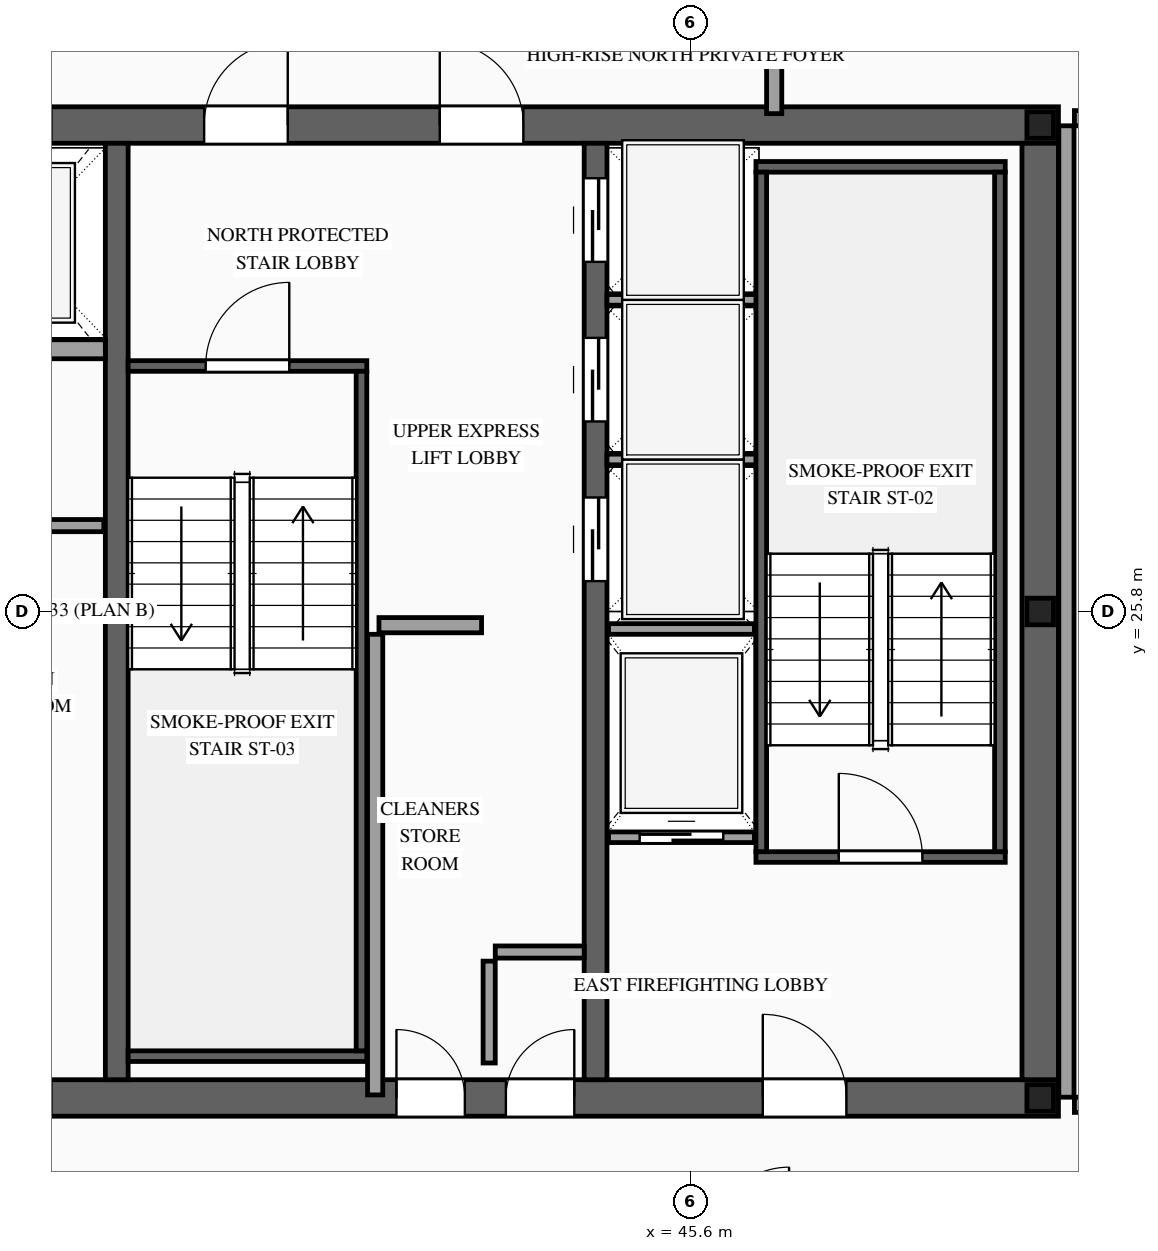
"""IFC4 building model, lengths in metres.
Left out: names, types, materials, properties, quantities, classifications, styles, units other than length and angle.
Written with IfcOpenShell. Run it as: python <this file> out.ifc"""

import sys

from ifc_helpers import new_model, si_unit, direction, frame, frame_2d, origin, origin_2d, place, context, subcontext, project, spatial, rectangle, i_section, extrude, source, transform, mapped, element, fill, save


model = new_model("IFC4")
c1 = context("Model", 3, precision=1e-05, world=origin(), true_north=direction((0.0, 1.0)))
c2 = subcontext(c1, "Body", "Model", "MODEL_VIEW")
j1 = project(units=[si_unit("LENGTHUNIT", "METRE"), si_unit("PLANEANGLEUNIT", "RADIAN")], contexts=[c1])
p1 = place(None, origin())
s1 = spatial("IfcSite", under=j1, at=p1, CompositionType="ELEMENT")
p2 = place(p1, origin())
s2 = spatial("IfcBuilding", under=s1, at=p2, CompositionType="ELEMENT")
p3 = place(p2, frame((0.0, 0.0, 325.2)))
s3 = spatial("IfcBuildingStorey", under=s2, at=p3, CompositionType="ELEMENT", Elevation=325.2)
p4 = place(p3, frame((23.56, 19.4, 0.0), z_axis=(0.0, 0.0, 1.0), x_axis=(1.0, 0.0, 0.0)))
e1 = element("IfcWall", 1, at=p4, inside=s3, PredefinedType="SHEAR", context=c2, shape_type="SweptSolid", body=[
    extrude(rectangle(XDim=26.88, YDim=0.48, at=frame_2d((13.44, 0.0))), origin(), (0.0, 0.0, 1.0), 3.5),
])
p5 = place(p4, frame((1.89, 0.0, 0.0)))
e2 = element("IfcOpeningElement", 2, at=p5, cuts=e1, PredefinedType="OPENING", context=c2, shape_type="SweptSolid", body=[
    extrude(rectangle(XDim=1.1, YDim=2.2, at=frame_2d((0.55, 1.1))), frame((0.0, 0.255, 0.0), z_axis=(0.0, -1.0, 0.0), x_axis=(1.0, 0.0, 0.0)), (0.0, 0.0, 1.0), 0.51),
])
p6 = place(p4, frame((9.79, 0.0, 0.0)))
e3 = element("IfcOpeningElement", 3, at=p6, cuts=e1, PredefinedType="OPENING", context=c2, shape_type="SweptSolid", body=[
    extrude(rectangle(XDim=1.1, YDim=2.2, at=frame_2d((0.55, 1.1))), frame((0.0, 0.255, 0.0), z_axis=(0.0, -1.0, 0.0), x_axis=(1.0, 0.0, 0.0)), (0.0, 0.0, 1.0), 0.51),
])
p7 = place(p4, frame((22.99, 0.0, 0.0)))
e4 = element("IfcOpeningElement", 4, at=p7, cuts=e1, PredefinedType="OPENING", context=c2, shape_type="SweptSolid", body=[
    extrude(rectangle(XDim=1.1, YDim=2.2, at=frame_2d((0.55, 1.1))), frame((0.0, 0.255, 0.0), z_axis=(0.0, -1.0, 0.0), x_axis=(1.0, 0.0, 0.0)), (0.0, 0.0, 1.0), 0.51),
])
p8 = place(p4, frame((19.61, 0.0, 0.0)))
e5 = element("IfcOpeningElement", 5, at=p8, cuts=e1, PredefinedType="OPENING", context=c2, shape_type="SweptSolid", body=[
    extrude(rectangle(XDim=0.9, YDim=2.15, at=frame_2d((0.45, 1.075))), frame((0.0, 0.255, 0.0), z_axis=(0.0, -1.0, 0.0), x_axis=(1.0, 0.0, 0.0)), (0.0, 0.0, 1.0), 0.51),
])
p9 = place(p4, frame((18.17, 0.0, 0.0)))
e6 = element("IfcOpeningElement", 6, at=p9, cuts=e1, PredefinedType="OPENING", context=c2, shape_type="SweptSolid", body=[
    extrude(rectangle(XDim=0.9, YDim=2.15, at=frame_2d((0.45, 1.075))), frame((0.0, 0.255, 0.0), z_axis=(0.0, -1.0, 0.0), x_axis=(1.0, 0.0, 0.0)), (0.0, 0.0, 1.0), 0.51),
])
p10 = place(p3, frame((23.56, 32.2, 0.0), z_axis=(0.0, 0.0, 1.0), x_axis=(1.0, 0.0, 0.0)))
e7 = element("IfcWall", 7, at=p10, inside=s3, PredefinedType="SHEAR", context=c2, shape_type="SweptSolid", body=[
    extrude(rectangle(XDim=26.88, YDim=0.48, at=frame_2d((13.44, 0.0))), origin(), (0.0, 0.0, 1.0), 3.5),
])
p11 = place(p10, frame((4.51, 0.0, 0.0)))
e8 = element("IfcOpeningElement", 8, at=p11, cuts=e7, PredefinedType="OPENING", context=c2, shape_type="SweptSolid", body=[
    extrude(rectangle(XDim=0.9, YDim=2.15, at=frame_2d((0.45, 1.075))), frame((0.0, 0.255, 0.0), z_axis=(0.0, -1.0, 0.0), x_axis=(1.0, 0.0, 0.0)), (0.0, 0.0, 1.0), 0.51),
])
p12 = place(p10, frame((9.79, 0.0, 0.0)))
e9 = element("IfcOpeningElement", 9, at=p12, cuts=e7, PredefinedType="OPENING", context=c2, shape_type="SweptSolid", body=[
    extrude(rectangle(XDim=1.1, YDim=2.2, at=frame_2d((0.55, 1.1))), frame((0.0, 0.255, 0.0), z_axis=(0.0, -1.0, 0.0), x_axis=(1.0, 0.0, 0.0)), (0.0, 0.0, 1.0), 0.51),
])
p13 = place(p10, frame((15.64, 0.0, 0.0)))
e10 = element("IfcOpeningElement", 10, at=p13, cuts=e7, PredefinedType="OPENING", context=c2, shape_type="SweptSolid", body=[
    extrude(rectangle(XDim=1.1, YDim=2.2, at=frame_2d((0.55, 1.1))), frame((0.0, 0.255, 0.0), z_axis=(0.0, -1.0, 0.0), x_axis=(1.0, 0.0, 0.0)), (0.0, 0.0, 1.0), 0.51),
])
p14 = place(p10, frame((18.74, 0.0, 0.0)))
e11 = element("IfcOpeningElement", 11, at=p14, cuts=e7, PredefinedType="OPENING", context=c2, shape_type="SweptSolid", body=[
    extrude(rectangle(XDim=1.1, YDim=2.2, at=frame_2d((0.55, 1.1))), frame((0.0, 0.255, 0.0), z_axis=(0.0, -1.0, 0.0), x_axis=(1.0, 0.0, 0.0)), (0.0, 0.0, 1.0), 0.51),
])
m1 = source(origin(), c2, "Body", "SweptSolid", [
    extrude(rectangle(XDim=12.32, YDim=0.48, at=frame_2d((6.16, 0.0))), origin(), (0.0, 0.0, 1.0), 3.5),
])
p15 = place(p3, frame((50.2, 19.64, 0.0), z_axis=(0.0, 0.0, 1.0), x_axis=(0.0, 1.0, 0.0)))
e12 = element("IfcWall", 12, at=p15, inside=s3, PredefinedType="SHEAR", context=c2, shape_type="MappedRepresentation", body=[
    mapped(m1, transform((0.0, 0.0, 0.0), scale=1.0)),
])
m2 = source(origin(), c2, "Body", "SweptSolid", [
    extrude(rectangle(XDim=12.32, YDim=0.3, at=frame_2d((6.16, 0.0))), origin(), (0.0, 0.0, 1.0), 3.5),
])
p16 = place(p3, frame((38.05, 19.64, 0.0), z_axis=(0.0, 0.0, 1.0), x_axis=(0.0, 1.0, 0.0)))
e13 = element("IfcWall", 13, at=p16, inside=s3, PredefinedType="SOLIDWALL", context=c2, shape_type="MappedRepresentation", body=[
    mapped(m2, transform((0.0, 0.0, 0.0), scale=1.0)),
])
p17 = place(p3, frame((44.35, 19.64, 0.0), z_axis=(0.0, 0.0, 1.0), x_axis=(0.0, 1.0, 0.0)))
e14 = element("IfcWall", 14, at=p17, inside=s3, PredefinedType="SOLIDWALL", context=c2, shape_type="SweptSolid", body=[
    extrude(rectangle(XDim=12.32, YDim=0.3, at=frame_2d((6.16, 0.0))), origin(), (0.0, 0.0, 1.0), 3.5),
])
p18 = place(p17, frame((6.56, 0.0, 0.0)))
e15 = element("IfcOpeningElement", 15, at=p18, cuts=e14, PredefinedType="OPENING", context=c2, shape_type="SweptSolid", body=[
    extrude(rectangle(XDim=1.1, YDim=2.2, at=frame_2d((0.55, 1.1))), frame((0.0, 0.165, 0.0), z_axis=(0.0, -1.0, 0.0), x_axis=(1.0, 0.0, 0.0)), (0.0, 0.0, 1.0), 0.33),
])
p19 = place(p17, frame((8.66, 0.0, 0.0)))
e16 = element("IfcOpeningElement", 16, at=p19, cuts=e14, PredefinedType="OPENING", context=c2, shape_type="SweptSolid", body=[
    extrude(rectangle(XDim=1.1, YDim=2.2, at=frame_2d((0.55, 1.1))), frame((0.0, 0.165, 0.0), z_axis=(0.0, -1.0, 0.0), x_axis=(1.0, 0.0, 0.0)), (0.0, 0.0, 1.0), 0.33),
])
p20 = place(p17, frame((10.76, 0.0, 0.0)))
e17 = element("IfcOpeningElement", 17, at=p20, cuts=e14, PredefinedType="OPENING", context=c2, shape_type="SweptSolid", body=[
    extrude(rectangle(XDim=1.1, YDim=2.2, at=frame_2d((0.55, 1.1))), frame((0.0, 0.165, 0.0), z_axis=(0.0, -1.0, 0.0), x_axis=(1.0, 0.0, 0.0)), (0.0, 0.0, 1.0), 0.33),
])
m3 = source(origin(), c2, "Body", "SweptSolid", [
    extrude(i_section(OverallWidth=0.35, OverallDepth=0.35, WebThickness=0.012, FlangeThickness=0.019, at=origin_2d()), origin(), (0.0, 0.0, 1.0), 3.5),
])
for number, where, z_axis, x_axis in (
    (18, (50.2, 19.4, 0.0), (0.0, 0.0, 1.0), (1.0, 0.0, 0.0)),
    (19, (50.2, 25.8, 0.0), (0.0, 0.0, 1.0), (1.0, 0.0, 0.0)),
    (20, (50.2, 32.2, 0.0), (0.0, 0.0, 1.0), (1.0, 0.0, 0.0)),
):
    element("IfcColumn", number, at=place(p3, frame(where, z_axis=z_axis, x_axis=x_axis)), inside=s3, PredefinedType="COLUMN", context=c2, shape_type="MappedRepresentation", body=[
        mapped(m3, transform((0.0, 0.0, 0.0), scale=1.0)),
    ])
p21 = place(p3, frame((44.52, 22.83, 0.0), z_axis=(0.0, 0.0, 1.0), x_axis=(1.0, 0.0, 0.0)))
e21 = element("IfcWall", 21, at=p21, inside=s3, PredefinedType="SOLIDWALL", context=c2, shape_type="SweptSolid", body=[
    extrude(rectangle(XDim=1.92, YDim=0.14, at=frame_2d((0.96, 0.0))), origin(), (0.0, 0.0, 1.0), 3.28),
])
p22 = place(p21, frame((0.41, 0.0, 0.0)))
e22 = element("IfcOpeningElement", 22, at=p22, cuts=e21, PredefinedType="OPENING", context=c2, shape_type="SweptSolid", body=[
    extrude(rectangle(XDim=1.1, YDim=2.2, at=frame_2d((0.55, 1.1))), frame((0.0, 0.085, 0.0), z_axis=(0.0, -1.0, 0.0), x_axis=(1.0, 0.0, 0.0)), (0.0, 0.0, 1.0), 0.17),
])
m4 = source(origin(), c2, "Body", "SweptSolid", [
    extrude(rectangle(XDim=1.92, YDim=0.14, at=frame_2d((0.96, 0.0))), origin(), (0.0, 0.0, 1.0), 3.28),
])
p23 = place(p3, frame((44.52, 25.57, 0.0), z_axis=(0.0, 0.0, 1.0), x_axis=(1.0, 0.0, 0.0)))
e23 = element("IfcWall", 23, at=p23, inside=s3, PredefinedType="SOLIDWALL", context=c2, shape_type="MappedRepresentation", body=[
    mapped(m4, transform((0.0, 0.0, 0.0), scale=1.0)),
])
m5 = source(origin(), c2, "Body", "SweptSolid", [
    extrude(rectangle(XDim=2.4, YDim=0.25, at=frame_2d((1.2, 0.0))), origin(), (0.0, 0.0, 1.0), 3.28),
])
p24 = place(p3, frame((35.5, 29.25, 0.0), z_axis=(0.0, 0.0, 1.0), x_axis=(1.0, 0.0, 0.0)))
e24 = element("IfcWall", 24, at=p24, inside=s3, PredefinedType="SOLIDWALL", context=c2, shape_type="MappedRepresentation", body=[
    mapped(m5, transform((0.0, 0.0, 0.0), scale=1.0)),
])
m6 = source(origin(), c2, "Body", "SweptSolid", [
    extrude(rectangle(XDim=2.0, YDim=0.14, at=frame_2d((1.0, 0.0))), origin(), (0.0, 0.0, 1.0), 3.28),
])
for number, where, z_axis, x_axis in (
    (25, (44.5, 27.8, 0.0), (0.0, 0.0, 1.0), (1.0, 0.0, 0.0)),
    (26, (44.5, 29.9, 0.0), (0.0, 0.0, 1.0), (1.0, 0.0, 0.0)),
):
    element("IfcWall", number, at=place(p3, frame(where, z_axis=z_axis, x_axis=x_axis)), inside=s3, PredefinedType="SOLIDWALL", context=c2, shape_type="MappedRepresentation", body=[
        mapped(m6, transform((0.0, 0.0, 0.0), scale=1.0)),
    ])
p25 = place(p3, frame((46.46, 22.57, 0.0), z_axis=(0.0, 0.0, 1.0), x_axis=(1.0, 0.0, 0.0)))
e27 = element("IfcWall", 27, at=p25, inside=s3, PredefinedType="SOLIDWALL", context=c2, shape_type="SweptSolid", body=[
    extrude(rectangle(XDim=3.28, YDim=0.14, at=frame_2d((1.64, 0.0))), origin(), (0.0, 0.0, 1.0), 3.28),
])
p26 = place(p25, frame((1.09, 0.0, 0.0)))
e28 = element("IfcOpeningElement", 28, at=p26, cuts=e27, PredefinedType="OPENING", context=c2, shape_type="SweptSolid", body=[
    extrude(rectangle(XDim=1.1, YDim=2.2, at=frame_2d((0.55, 1.1))), frame((0.0, 0.085, 0.0), z_axis=(0.0, -1.0, 0.0), x_axis=(1.0, 0.0, 0.0)), (0.0, 0.0, 1.0), 0.17),
])
m7 = source(origin(), c2, "Body", "SweptSolid", [
    extrude(rectangle(XDim=3.28, YDim=0.14, at=frame_2d((1.64, 0.0))), origin(), (0.0, 0.0, 1.0), 3.28),
])
p27 = place(p3, frame((46.46, 31.65, 0.0), z_axis=(0.0, 0.0, 1.0), x_axis=(1.0, 0.0, 0.0)))
e29 = element("IfcWall", 29, at=p27, inside=s3, PredefinedType="SOLIDWALL", context=c2, shape_type="MappedRepresentation", body=[
    mapped(m7, transform((0.0, 0.0, 0.0), scale=1.0)),
])
m8 = source(origin(), c2, "Body", "SweptSolid", [
    extrude(rectangle(XDim=8.94, YDim=0.14, at=frame_2d((4.47, 0.0))), origin(), (0.0, 0.0, 1.0), 3.28),
])
for number, where, z_axis, x_axis in (
    (30, (46.53, 22.64, 0.0), (0.0, 0.0, 1.0), (0.0, 1.0, 0.0)),
    (31, (49.67, 22.64, 0.0), (0.0, 0.0, 1.0), (0.0, 1.0, 0.0)),
):
    element("IfcWall", number, at=place(p3, frame(where, z_axis=z_axis, x_axis=x_axis)), inside=s3, PredefinedType="SOLIDWALL", context=c2, shape_type="MappedRepresentation", body=[
        mapped(m8, transform((0.0, 0.0, 0.0), scale=1.0)),
    ])
p28 = place(p3, frame((38.2, 29.03, 0.0), z_axis=(0.0, 0.0, 1.0), x_axis=(1.0, 0.0, 0.0)))
e32 = element("IfcWall", 32, at=p28, inside=s3, PredefinedType="SOLIDWALL", context=c2, shape_type="SweptSolid", body=[
    extrude(rectangle(XDim=3.14, YDim=0.14, at=frame_2d((1.57, 0.0))), origin(), (0.0, 0.0, 1.0), 3.28),
])
p29 = place(p28, frame((1.02, 0.0, 0.0)))
e33 = element("IfcOpeningElement", 33, at=p29, cuts=e32, PredefinedType="OPENING", context=c2, shape_type="SweptSolid", body=[
    extrude(rectangle(XDim=1.1, YDim=2.2, at=frame_2d((0.55, 1.1))), frame((0.0, 0.085, 0.0), z_axis=(0.0, -1.0, 0.0), x_axis=(1.0, 0.0, 0.0)), (0.0, 0.0, 1.0), 0.17),
])
m9 = source(origin(), c2, "Body", "SweptSolid", [
    extrude(rectangle(XDim=3.14, YDim=0.14, at=frame_2d((1.57, 0.0))), origin(), (0.0, 0.0, 1.0), 3.28),
])
p30 = place(p3, frame((38.2, 19.95, 0.0), z_axis=(0.0, 0.0, 1.0), x_axis=(1.0, 0.0, 0.0)))
e34 = element("IfcWall", 34, at=p30, inside=s3, PredefinedType="SOLIDWALL", context=c2, shape_type="MappedRepresentation", body=[
    mapped(m9, transform((0.0, 0.0, 0.0), scale=1.0)),
])
m10 = source(origin(), c2, "Body", "SweptSolid", [
    extrude(rectangle(XDim=8.94, YDim=0.14, at=frame_2d((4.47, 0.0))), origin(), (0.0, 0.0, 1.0), 3.28),
])
p31 = place(p3, frame((41.27, 20.02, 0.0), z_axis=(0.0, 0.0, 1.0), x_axis=(0.0, 1.0, 0.0)))
e35 = element("IfcWall", 35, at=p31, inside=s3, PredefinedType="SOLIDWALL", context=c2, shape_type="MappedRepresentation", body=[
    mapped(m10, transform((0.0, 0.0, 0.0), scale=1.0)),
])
m11 = source(origin(), c2, "Body", "SweptSolid", [
    extrude(rectangle(XDim=2.36, YDim=0.16, at=frame_2d((1.18, 0.0))), origin(), (0.0, 0.0, 1.0), 3.28),
])
p32 = place(p3, frame((35.52, 26.93, 0.0), z_axis=(0.0, 0.0, 1.0), x_axis=(1.0, 0.0, 0.0)))
e36 = element("IfcWall", 36, at=p32, inside=s3, PredefinedType="PARTITIONING", context=c2, shape_type="MappedRepresentation", body=[
    mapped(m11, transform((0.0, 0.0, 0.0), scale=1.0)),
])
m12 = source(origin(), c2, "Body", "SweptSolid", [
    extrude(rectangle(XDim=1.34, YDim=0.16, at=frame_2d((0.67, 0.0))), origin(), (0.0, 0.0, 1.0), 3.28),
])
p33 = place(p3, frame((42.95, 19.86, 0.0), z_axis=(0.0, 0.0, 1.0), x_axis=(0.0, 1.0, 0.0)))
e37 = element("IfcWall", 37, at=p33, inside=s3, PredefinedType="PARTITIONING", context=c2, shape_type="MappedRepresentation", body=[
    mapped(m12, transform((0.0, 0.0, 0.0), scale=1.0)),
])
m13 = source(origin(), c2, "Body", "SweptSolid", [
    extrude(rectangle(XDim=1.17, YDim=0.16, at=frame_2d((0.585, 0.0))), origin(), (0.0, 0.0, 1.0), 3.28),
])
p34 = place(p3, frame((43.03, 21.32, 0.0), z_axis=(0.0, 0.0, 1.0), x_axis=(1.0, 0.0, 0.0)))
e38 = element("IfcWall", 38, at=p34, inside=s3, PredefinedType="PARTITIONING", context=c2, shape_type="MappedRepresentation", body=[
    mapped(m13, transform((0.0, 0.0, 0.0), scale=1.0)),
])
m14 = source(origin(), c2, "Body", "SweptSolid", [
    extrude(rectangle(XDim=6.06, YDim=0.2, at=frame_2d((3.03, 0.0))), origin(), (0.0, 0.0, 1.0), 3.28),
])
p35 = place(p3, frame((41.45, 19.44, 0.0), z_axis=(0.0, 0.0, 1.0), x_axis=(0.0, 1.0, 0.0)))
e39 = element("IfcWall", 39, at=p35, inside=s3, PredefinedType="PARTITIONING", context=c2, shape_type="MappedRepresentation", body=[
    mapped(m14, transform((0.0, 0.0, 0.0), scale=1.0)),
])
m15 = source(origin(), c2, "Body", "SweptSolid", [
    extrude(rectangle(XDim=1.35, YDim=0.2, at=frame_2d((0.675, 0.0))), origin(), (0.0, 0.0, 1.0), 3.28),
])
p36 = place(p3, frame((41.5, 25.62, 0.0), z_axis=(0.0, 0.0, 1.0), x_axis=(1.0, 0.0, 0.0)))
e40 = element("IfcWall", 40, at=p36, inside=s3, PredefinedType="PARTITIONING", context=c2, shape_type="MappedRepresentation", body=[
    mapped(m15, transform((0.0, 0.0, 0.0), scale=1.0)),
])
m16 = source(origin(), c2, "Body", "SweptSolid", [
    extrude(rectangle(XDim=1.7, YDim=0.2, at=frame_2d((0.85, 0.0))), origin(), (0.0, 0.0, 1.0), 3.28),
])
p37 = place(p3, frame((46.7, 32.35, 0.0), z_axis=(0.0, 0.0, 1.0), x_axis=(0.0, 1.0, 0.0)))
e41 = element("IfcWall", 41, at=p37, inside=s3, PredefinedType="PARTITIONING", context=c2, shape_type="MappedRepresentation", body=[
    mapped(m16, transform((0.0, 0.0, 0.0), scale=1.0)),
])
p38 = place(p3, frame((50.65, 19.31, 0.0), z_axis=(0.0, 0.0, 1.0), x_axis=(1.0, 0.0, 0.0)))
e42 = element("IfcWall", 42, at=p38, inside=s3, PredefinedType="PARTITIONING", context=c2, shape_type="SweptSolid", body=[
    extrude(rectangle(XDim=5.3, YDim=0.2, at=frame_2d((2.65, 0.0))), origin(), (0.0, 0.0, 1.0), 2.825),
])
p39 = place(p38, frame((0.4, 0.0, 0.0)))
e43 = element("IfcOpeningElement", 43, at=p39, cuts=e42, PredefinedType="OPENING", context=c2, shape_type="SweptSolid", body=[
    extrude(rectangle(XDim=1.0, YDim=2.2, at=frame_2d((0.5, 1.1))), frame((0.0, 0.115, 0.0), z_axis=(0.0, -1.0, 0.0), x_axis=(1.0, 0.0, 0.0)), (0.0, 0.0, 1.0), 0.23),
])
m17 = source(origin(), c2, "Body", "SweptSolid", [
    extrude(rectangle(XDim=5.3, YDim=0.2, at=frame_2d((2.65, 0.0))), origin(), (0.0, 0.0, 1.0), 2.825),
])
p40 = place(p3, frame((50.65, 32.29, 0.0), z_axis=(0.0, 0.0, 1.0), x_axis=(1.0, 0.0, 0.0)))
e44 = element("IfcWall", 44, at=p40, inside=s3, PredefinedType="PARTITIONING", context=c2, shape_type="MappedRepresentation", body=[
    mapped(m17, transform((0.0, 0.0, 0.0), scale=1.0)),
])
m18 = source(origin(), c2, "Body", "SweptSolid", [
    extrude(rectangle(XDim=12.78, YDim=0.2, at=frame_2d((6.39, 0.0))), origin(), (0.0, 0.0, 1.0), 3.28),
])
p41 = place(p3, frame((50.545, 19.41, 0.0), z_axis=(0.0, 0.0, 1.0), x_axis=(0.0, 1.0, 0.0)))
e45 = element("IfcWall", 45, at=p41, inside=s3, PredefinedType="PARTITIONING", context=c2, shape_type="MappedRepresentation", body=[
    mapped(m18, transform((0.0, 0.0, 0.0), scale=1.0)),
])
m19 = source(origin(), c2, "Body", "SweptSolid", [
    extrude(rectangle(XDim=1.1, YDim=2.2, at=frame_2d((0.55, 1.1))), frame((0.0, 0.025, 0.0), z_axis=(0.0, -1.0, 0.0), x_axis=(1.0, 0.0, 0.0)), (0.0, 0.0, 1.0), 0.05),
])
p42 = place(p22, origin())
e46 = element("IfcDoor", 46, at=p42, inside=s3, OperationType="SLIDING_TO_RIGHT", PredefinedType="DOOR", context=c2, shape_type="MappedRepresentation", body=[
    mapped(m19, transform((0.0, 0.0, 0.0), scale=1.0)),
])
fill(e22, e46)
p43 = place(p18, origin())
e47 = element("IfcDoor", 47, at=p43, inside=s3, OperationType="SLIDING_TO_LEFT", PredefinedType="DOOR", context=c2, shape_type="MappedRepresentation", body=[
    mapped(m19, transform((0.0, 0.0, 0.0), scale=1.0)),
])
fill(e15, e47)
p44 = place(p19, origin())
e48 = element("IfcDoor", 48, at=p44, inside=s3, OperationType="SLIDING_TO_RIGHT", PredefinedType="DOOR", context=c2, shape_type="MappedRepresentation", body=[
    mapped(m19, transform((0.0, 0.0, 0.0), scale=1.0)),
])
fill(e16, e48)
p45 = place(p20, origin())
e49 = element("IfcDoor", 49, at=p45, inside=s3, OperationType="SLIDING_TO_LEFT", PredefinedType="DOOR", context=c2, shape_type="MappedRepresentation", body=[
    mapped(m19, transform((0.0, 0.0, 0.0), scale=1.0)),
])
fill(e17, e49)
m20 = source(origin(), c2, "Body", "SweptSolid", [
    extrude(rectangle(XDim=1.1, YDim=2.2, at=frame_2d((0.55, 1.1))), frame((0.0, 0.025, 0.0), z_axis=(0.0, -1.0, 0.0), x_axis=(1.0, 0.0, 0.0)), (0.0, 0.0, 1.0), 0.05),
])
p46 = place(p26, origin())
e50 = element("IfcDoor", 50, at=p46, inside=s3, OperationType="SINGLE_SWING_LEFT", PredefinedType="DOOR", context=c2, shape_type="MappedRepresentation", body=[
    mapped(m20, transform((0.0, 0.0, 0.0), scale=1.0)),
])
fill(e28, e50)
p47 = place(p29, origin())
e51 = element("IfcDoor", 51, at=p47, inside=s3, OperationType="SINGLE_SWING_RIGHT", PredefinedType="DOOR", context=c2, shape_type="MappedRepresentation", body=[
    mapped(m20, transform((0.0, 0.0, 0.0), scale=1.0)),
])
fill(e33, e51)
p48 = place(p7, origin())
e52 = element("IfcDoor", 52, at=p48, inside=s3, OperationType="SINGLE_SWING_LEFT", PredefinedType="DOOR", context=c2, shape_type="MappedRepresentation", body=[
    mapped(m20, transform((0.0, 0.0, 0.0), scale=1.0)),
])
fill(e4, e52)
p49 = place(p13, origin())
e53 = element("IfcDoor", 53, at=p49, inside=s3, OperationType="SINGLE_SWING_RIGHT", PredefinedType="DOOR", context=c2, shape_type="MappedRepresentation", body=[
    mapped(m20, transform((0.0, 0.0, 0.0), scale=1.0)),
])
fill(e10, e53)
p50 = place(p14, origin())
e54 = element("IfcDoor", 54, at=p50, inside=s3, OperationType="SINGLE_SWING_LEFT", PredefinedType="DOOR", context=c2, shape_type="MappedRepresentation", body=[
    mapped(m20, transform((0.0, 0.0, 0.0), scale=1.0)),
])
fill(e11, e54)
m21 = source(origin(), c2, "Body", "SweptSolid", [
    extrude(rectangle(XDim=0.9, YDim=2.15, at=frame_2d((0.45, 1.075))), frame((0.0, 0.025, 0.0), z_axis=(0.0, -1.0, 0.0), x_axis=(1.0, 0.0, 0.0)), (0.0, 0.0, 1.0), 0.05),
])
p51 = place(p8, origin())
e55 = element("IfcDoor", 55, at=p51, inside=s3, OperationType="SINGLE_SWING_RIGHT", PredefinedType="DOOR", context=c2, shape_type="MappedRepresentation", body=[
    mapped(m21, transform((0.0, 0.0, 0.0), scale=1.0)),
])
fill(e5, e55)
p52 = place(p9, origin())
e56 = element("IfcDoor", 56, at=p52, inside=s3, OperationType="SINGLE_SWING_LEFT", PredefinedType="DOOR", context=c2, shape_type="MappedRepresentation", body=[
    mapped(m21, transform((0.0, 0.0, 0.0), scale=1.0)),
])
fill(e6, e56)
save(model, sys.argv[1])
